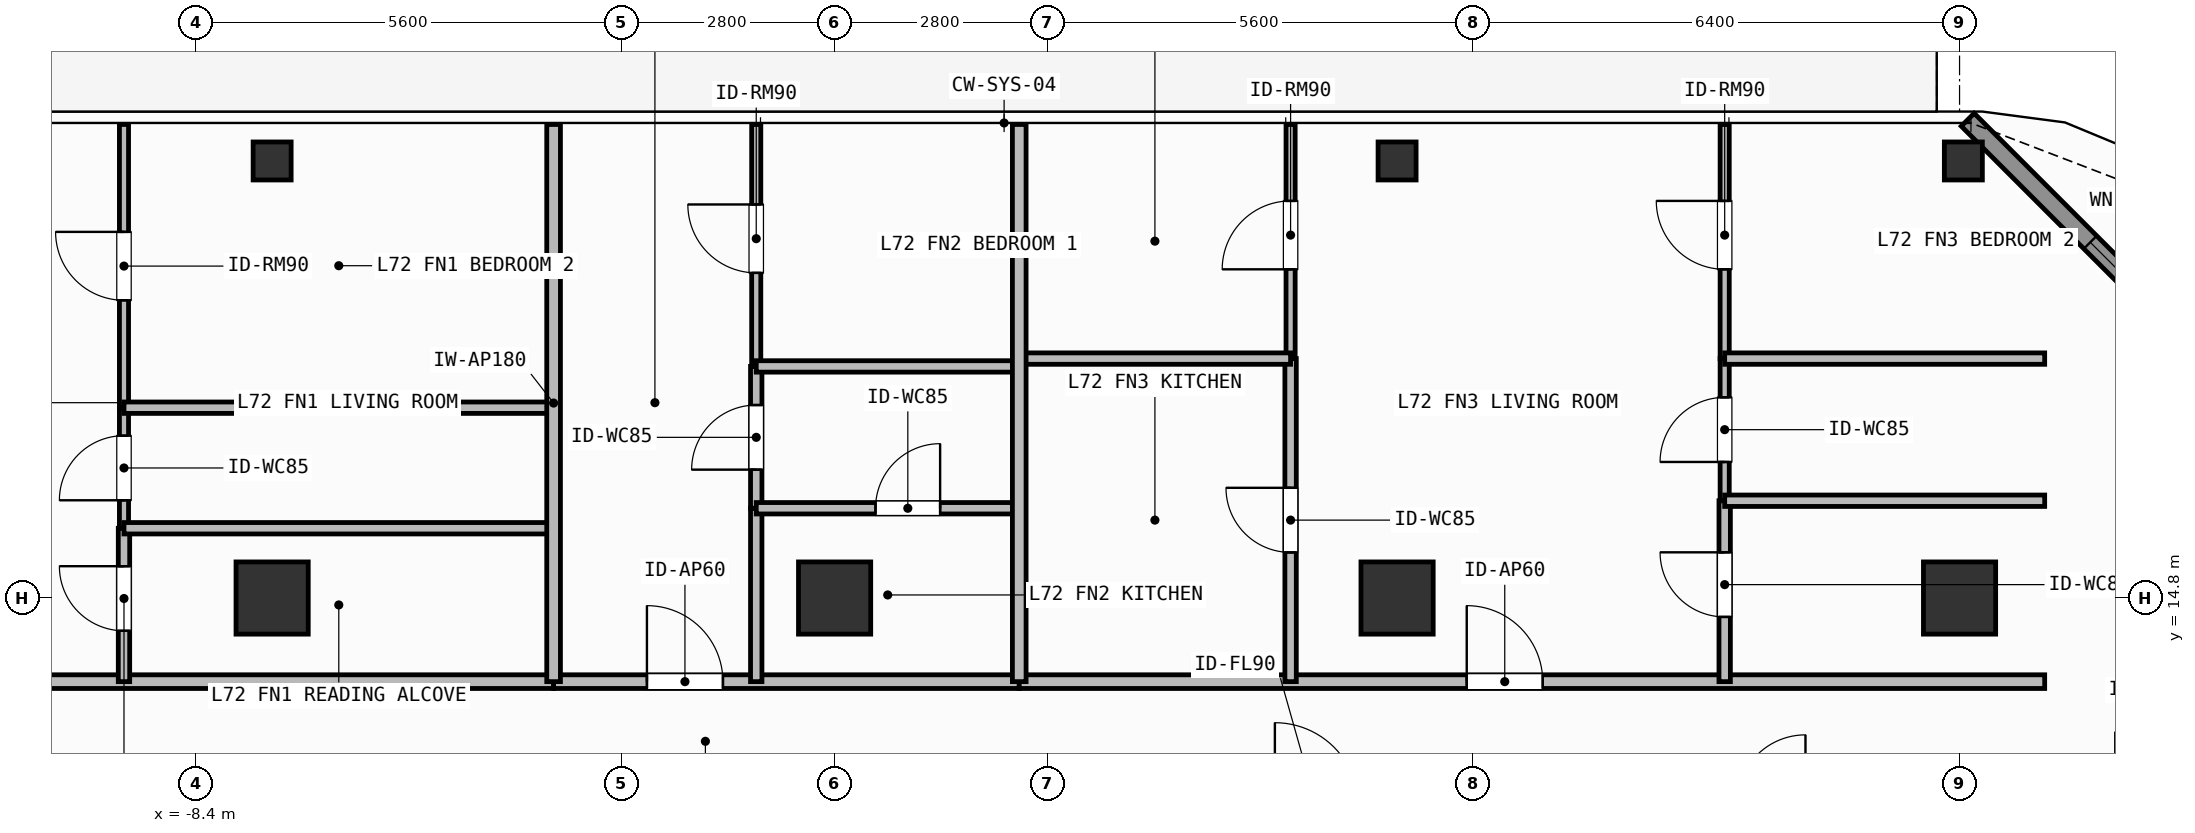
"""IFC4 building model, lengths in metres.
Left out: names, types, materials, properties, quantities, classifications, styles, units other than length and angle.
Written with IfcOpenShell. Run it as: python <this file> out.ifc"""

import sys

from ifc_helpers import new_model, si_unit, direction, frame, frame_2d, origin, origin_2d, place, context, subcontext, project, spatial, rectangle, hollow_rectangle, extrude, element, fill, save


model = new_model("IFC4")
c1 = context("Model", 3, precision=1e-05, world=origin(), true_north=direction((0.0, 1.0)))
c2 = subcontext(c1, "Body", "Model", "MODEL_VIEW")
j1 = project(units=[si_unit("LENGTHUNIT", "METRE"), si_unit("PLANEANGLEUNIT", "RADIAN")], contexts=[c1])
p1 = place(None, origin())
s1 = spatial("IfcSite", under=j1, at=p1, CompositionType="ELEMENT")
p2 = place(p1, origin())
s2 = spatial("IfcBuilding", under=s1, at=p2, CompositionType="ELEMENT")
p3 = place(p2, frame((0.0, 0.0, 293.7)))
s3 = spatial("IfcBuildingStorey", under=s2, at=p3, CompositionType="ELEMENT", Elevation=293.7)
for number, where, z_axis, x_axis in (
    (1, (-7.4, 14.8, 0.0), (0.0, 0.0, 1.0), (1.0, 0.0, 0.0)),
    (2, (0.0, 14.8, 0.0), (0.0, 0.0, 1.0), (1.0, 0.0, 0.0)),
    (3, (7.4, 14.8, 0.0), (0.0, 0.0, 1.0), (1.0, 0.0, 0.0)),
    (4, (14.8, 14.8, 0.0), (0.0, 0.0, 1.0), (1.0, 0.0, 0.0)),
):
    element("IfcColumn", number, at=place(p3, frame(where, z_axis=z_axis, x_axis=x_axis)), inside=s3, PredefinedType="COLUMN", context=c2, shape_type="SweptSolid", body=[
        extrude(rectangle(XDim=0.95, YDim=0.95, at=origin_2d()), origin(), (0.0, 0.0, 1.0), 3.9),
    ])
for number, where, z_axis, x_axis in (
    (5, (14.85, 20.55, 0.0), (0.0, 0.0, 1.0), (1.0, 0.0, 0.0)),
    (6, (-7.4, 20.55, 0.0), (0.0, 0.0, 1.0), (1.0, 0.0, 0.0)),
    (7, (7.4, 20.55, 0.0), (0.0, 0.0, 1.0), (1.0, 0.0, 0.0)),
):
    element("IfcColumn", number, at=place(p3, frame(where, z_axis=z_axis, x_axis=x_axis)), inside=s3, PredefinedType="COLUMN", context=c2, shape_type="SweptSolid", body=[
        extrude(hollow_rectangle(XDim=0.5, YDim=0.5, WallThickness=0.025, at=origin_2d()), origin(), (0.0, 0.0, 1.0), 3.9),
    ])
p4 = place(p3, frame((14.908, 21.092, 0.0), z_axis=(0.0, 0.0, 1.0), x_axis=(0.707106781187, -0.707106781187, 0.0)))
e8 = element("IfcWall", 8, at=p4, inside=s3, PredefinedType="SOLIDWALL", context=c2, shape_type="SweptSolid", body=[
    extrude(rectangle(XDim=6.059, YDim=0.24, at=frame_2d((3.03, 0.0))), origin(), (0.0, 0.0, 1.0), 3.68),
])
p5 = place(p4, frame((2.28, 0.0, 0.8)))
e9 = element("IfcOpeningElement", 9, at=p5, cuts=e8, PredefinedType="OPENING", context=c2, shape_type="SweptSolid", body=[
    extrude(rectangle(XDim=1.5, YDim=1.85, at=frame_2d((0.75, 0.925))), frame((0.0, 0.13, 0.0), z_axis=(0.0, -1.0, 0.0), x_axis=(1.0, 0.0, 0.0)), (0.0, 0.0, 1.0), 0.26),
])
p6 = place(p3, frame((-19.32, 13.7, 0.0), z_axis=(0.0, 0.0, 1.0), x_axis=(1.0, 0.0, 0.0)))
e10 = element("IfcWall", 10, at=p6, inside=s3, PredefinedType="PARTITIONING", context=c2, shape_type="SweptSolid", body=[
    extrude(rectangle(XDim=15.623, YDim=0.18, at=frame_2d((7.812, 0.0))), origin(), (0.0, 0.0, 1.0), 3.68),
])
p7 = place(p6, frame((7.669, 0.0, 0.0)))
e11 = element("IfcOpeningElement", 11, at=p7, cuts=e10, PredefinedType="OPENING", context=c2, shape_type="SweptSolid", body=[
    extrude(rectangle(XDim=1.0, YDim=2.2, at=frame_2d((0.5, 1.1))), frame((0.0, 0.1, 0.0), z_axis=(0.0, -1.0, 0.0), x_axis=(1.0, 0.0, 0.0)), (0.0, 0.0, 1.0), 0.2),
])
p8 = place(p3, frame((-9.349, 13.7, 0.0), z_axis=(0.0, 0.0, 1.0), x_axis=(0.0, 1.0, 0.0)))
e12 = element("IfcWall", 12, at=p8, inside=s3, PredefinedType="PARTITIONING", context=c2, shape_type="SweptSolid", body=[
    extrude(rectangle(XDim=2.018, YDim=0.15, at=frame_2d((1.009, 0.0))), origin(), (0.0, 0.0, 1.0), 3.68),
])
p9 = place(p8, frame((0.669, 0.0, 0.0)))
e13 = element("IfcOpeningElement", 13, at=p9, cuts=e12, PredefinedType="OPENING", context=c2, shape_type="SweptSolid", body=[
    extrude(rectangle(XDim=0.85, YDim=2.1, at=frame_2d((0.425, 1.05))), frame((0.0, 0.085, 0.0), z_axis=(0.0, -1.0, 0.0), x_axis=(1.0, 0.0, 0.0)), (0.0, 0.0, 1.0), 0.17),
])
p10 = place(p3, frame((-9.349, 15.718, 0.0), z_axis=(0.0, 0.0, 1.0), x_axis=(0.0, 1.0, 0.0)))
e14 = element("IfcWall", 14, at=p10, inside=s3, PredefinedType="PARTITIONING", context=c2, shape_type="SweptSolid", body=[
    extrude(rectangle(XDim=1.586, YDim=0.12, at=frame_2d((0.793, 0.0))), origin(), (0.0, 0.0, 1.0), 3.68),
])
p11 = place(p10, frame((0.368, 0.0, 0.0)))
e15 = element("IfcOpeningElement", 15, at=p11, cuts=e14, PredefinedType="OPENING", context=c2, shape_type="SweptSolid", body=[
    extrude(rectangle(XDim=0.85, YDim=2.1, at=frame_2d((0.425, 1.05))), frame((0.0, 0.07, 0.0), z_axis=(0.0, -1.0, 0.0), x_axis=(1.0, 0.0, 0.0)), (0.0, 0.0, 1.0), 0.14),
])
p12 = place(p3, frame((-9.349, 17.304, 0.0), z_axis=(0.0, 0.0, 1.0), x_axis=(0.0, 1.0, 0.0)))
e16 = element("IfcWall", 16, at=p12, inside=s3, PredefinedType="PARTITIONING", context=c2, shape_type="SweptSolid", body=[
    extrude(rectangle(XDim=3.726, YDim=0.12, at=frame_2d((1.863, 0.0))), origin(), (0.0, 0.0, 1.0), 3.68),
])
p13 = place(p12, frame((1.413, 0.0, 0.0)))
e17 = element("IfcOpeningElement", 17, at=p13, cuts=e16, PredefinedType="OPENING", context=c2, shape_type="SweptSolid", body=[
    extrude(rectangle(XDim=0.9, YDim=2.1, at=frame_2d((0.45, 1.05))), frame((0.0, 0.07, 0.0), z_axis=(0.0, -1.0, 0.0), x_axis=(1.0, 0.0, 0.0)), (0.0, 0.0, 1.0), 0.14),
])
p14 = place(p3, frame((-3.697, 13.7, 0.0), z_axis=(0.0, 0.0, 1.0), x_axis=(1.0, 0.0, 0.0)))
e18 = element("IfcWall", 18, at=p14, inside=s3, PredefinedType="PARTITIONING", context=c2, shape_type="SweptSolid", body=[
    extrude(rectangle(XDim=6.126, YDim=0.18, at=frame_2d((3.063, 0.0))), origin(), (0.0, 0.0, 1.0), 3.68),
])
p15 = place(p14, frame((1.228, 0.0, 0.0)))
e19 = element("IfcOpeningElement", 19, at=p15, cuts=e18, PredefinedType="OPENING", context=c2, shape_type="SweptSolid", body=[
    extrude(rectangle(XDim=1.0, YDim=2.2, at=frame_2d((0.5, 1.1))), frame((0.0, 0.1, 0.0), z_axis=(0.0, -1.0, 0.0), x_axis=(1.0, 0.0, 0.0)), (0.0, 0.0, 1.0), 0.2),
])
p16 = place(p3, frame((-1.031, 13.7, 0.0), z_axis=(0.0, 0.0, 1.0), x_axis=(0.0, 1.0, 0.0)))
e20 = element("IfcWall", 20, at=p16, inside=s3, PredefinedType="PARTITIONING", context=c2, shape_type="SweptSolid", body=[
    extrude(rectangle(XDim=2.281, YDim=0.15, at=frame_2d((1.141, 0.0))), origin(), (0.0, 0.0, 1.0), 3.68),
])
p17 = place(p3, frame((-1.031, 15.981, 0.0), z_axis=(0.0, 0.0, 1.0), x_axis=(0.0, 1.0, 0.0)))
e21 = element("IfcWall", 21, at=p17, inside=s3, PredefinedType="PARTITIONING", context=c2, shape_type="SweptSolid", body=[
    extrude(rectangle(XDim=1.866, YDim=0.15, at=frame_2d((0.933, 0.0))), origin(), (0.0, 0.0, 1.0), 3.68),
])
p18 = place(p17, frame((0.508, 0.0, 0.0)))
e22 = element("IfcOpeningElement", 22, at=p18, cuts=e21, PredefinedType="OPENING", context=c2, shape_type="SweptSolid", body=[
    extrude(rectangle(XDim=0.85, YDim=2.1, at=frame_2d((0.425, 1.05))), frame((0.0, 0.085, 0.0), z_axis=(0.0, -1.0, 0.0), x_axis=(1.0, 0.0, 0.0)), (0.0, 0.0, 1.0), 0.17),
])
p19 = place(p3, frame((-1.031, 17.847, 0.0), z_axis=(0.0, 0.0, 1.0), x_axis=(0.0, 1.0, 0.0)))
e23 = element("IfcWall", 23, at=p19, inside=s3, PredefinedType="PARTITIONING", context=c2, shape_type="SweptSolid", body=[
    extrude(rectangle(XDim=3.183, YDim=0.12, at=frame_2d((1.592, 0.0))), origin(), (0.0, 0.0, 1.0), 3.68),
])
p20 = place(p19, frame((1.231, 0.0, 0.0)))
e24 = element("IfcOpeningElement", 24, at=p20, cuts=e23, PredefinedType="OPENING", context=c2, shape_type="SweptSolid", body=[
    extrude(rectangle(XDim=0.9, YDim=2.1, at=frame_2d((0.45, 1.05))), frame((0.0, 0.07, 0.0), z_axis=(0.0, -1.0, 0.0), x_axis=(1.0, 0.0, 0.0)), (0.0, 0.0, 1.0), 0.14),
])
p21 = place(p3, frame((2.429, 13.7, 0.0), z_axis=(0.0, 0.0, 1.0), x_axis=(1.0, 0.0, 0.0)))
e25 = element("IfcWall", 25, at=p21, inside=s3, PredefinedType="PARTITIONING", context=c2, shape_type="SweptSolid", body=[
    extrude(rectangle(XDim=13.491, YDim=0.18, at=frame_2d((6.746, 0.0))), origin(), (0.0, 0.0, 1.0), 3.68),
])
p22 = place(p21, frame((5.887, 0.0, 0.0)))
e26 = element("IfcOpeningElement", 26, at=p22, cuts=e25, PredefinedType="OPENING", context=c2, shape_type="SweptSolid", body=[
    extrude(rectangle(XDim=1.0, YDim=2.2, at=frame_2d((0.5, 1.1))), frame((0.0, 0.1, 0.0), z_axis=(0.0, -1.0, 0.0), x_axis=(1.0, 0.0, 0.0)), (0.0, 0.0, 1.0), 0.2),
])
p23 = place(p3, frame((5.999, 13.7, 0.0), z_axis=(0.0, 0.0, 1.0), x_axis=(0.0, 1.0, 0.0)))
e27 = element("IfcWall", 27, at=p23, inside=s3, PredefinedType="PARTITIONING", context=c2, shape_type="SweptSolid", body=[
    extrude(rectangle(XDim=4.25, YDim=0.15, at=frame_2d((2.125, 0.0))), origin(), (0.0, 0.0, 1.0), 3.68),
])
p24 = place(p23, frame((1.7, 0.0, 0.0)))
e28 = element("IfcOpeningElement", 28, at=p24, cuts=e27, PredefinedType="OPENING", context=c2, shape_type="SweptSolid", body=[
    extrude(rectangle(XDim=0.85, YDim=2.1, at=frame_2d((0.425, 1.05))), frame((0.0, 0.085, 0.0), z_axis=(0.0, -1.0, 0.0), x_axis=(1.0, 0.0, 0.0)), (0.0, 0.0, 1.0), 0.17),
])
p25 = place(p3, frame((5.999, 17.95, 0.0), z_axis=(0.0, 0.0, 1.0), x_axis=(0.0, 1.0, 0.0)))
e29 = element("IfcWall", 29, at=p25, inside=s3, PredefinedType="PARTITIONING", context=c2, shape_type="SweptSolid", body=[
    extrude(rectangle(XDim=3.08, YDim=0.12, at=frame_2d((1.54, 0.0))), origin(), (0.0, 0.0, 1.0), 3.68),
])
p26 = place(p25, frame((1.175, 0.0, 0.0)))
e30 = element("IfcOpeningElement", 30, at=p26, cuts=e29, PredefinedType="OPENING", context=c2, shape_type="SweptSolid", body=[
    extrude(rectangle(XDim=0.9, YDim=2.1, at=frame_2d((0.45, 1.05))), frame((0.0, 0.07, 0.0), z_axis=(0.0, -1.0, 0.0), x_axis=(1.0, 0.0, 0.0)), (0.0, 0.0, 1.0), 0.14),
])
p27 = place(p3, frame((11.71, 13.7, 0.0), z_axis=(0.0, 0.0, 1.0), x_axis=(0.0, 1.0, 0.0)))
e31 = element("IfcWall", 31, at=p27, inside=s3, PredefinedType="PARTITIONING", context=c2, shape_type="SweptSolid", body=[
    extrude(rectangle(XDim=2.38, YDim=0.15, at=frame_2d((1.19, 0.0))), origin(), (0.0, 0.0, 1.0), 3.68),
])
p28 = place(p27, frame((0.851, 0.0, 0.0)))
e32 = element("IfcOpeningElement", 32, at=p28, cuts=e31, PredefinedType="OPENING", context=c2, shape_type="SweptSolid", body=[
    extrude(rectangle(XDim=0.85, YDim=2.1, at=frame_2d((0.425, 1.05))), frame((0.0, 0.085, 0.0), z_axis=(0.0, -1.0, 0.0), x_axis=(1.0, 0.0, 0.0)), (0.0, 0.0, 1.0), 0.17),
])
p29 = place(p3, frame((11.71, 16.08, 0.0), z_axis=(0.0, 0.0, 1.0), x_axis=(0.0, 1.0, 0.0)))
e33 = element("IfcWall", 33, at=p29, inside=s3, PredefinedType="PARTITIONING", context=c2, shape_type="SweptSolid", body=[
    extrude(rectangle(XDim=1.87, YDim=0.12, at=frame_2d((0.935, 0.0))), origin(), (0.0, 0.0, 1.0), 3.68),
])
p30 = place(p29, frame((0.51, 0.0, 0.0)))
e34 = element("IfcOpeningElement", 34, at=p30, cuts=e33, PredefinedType="OPENING", context=c2, shape_type="SweptSolid", body=[
    extrude(rectangle(XDim=0.85, YDim=2.1, at=frame_2d((0.425, 1.05))), frame((0.0, 0.07, 0.0), z_axis=(0.0, -1.0, 0.0), x_axis=(1.0, 0.0, 0.0)), (0.0, 0.0, 1.0), 0.14),
])
p31 = place(p3, frame((11.71, 17.95, 0.0), z_axis=(0.0, 0.0, 1.0), x_axis=(0.0, 1.0, 0.0)))
e35 = element("IfcWall", 35, at=p31, inside=s3, PredefinedType="PARTITIONING", context=c2, shape_type="SweptSolid", body=[
    extrude(rectangle(XDim=3.08, YDim=0.12, at=frame_2d((1.54, 0.0))), origin(), (0.0, 0.0, 1.0), 3.68),
])
p32 = place(p31, frame((1.175, 0.0, 0.0)))
e36 = element("IfcOpeningElement", 36, at=p32, cuts=e35, PredefinedType="OPENING", context=c2, shape_type="SweptSolid", body=[
    extrude(rectangle(XDim=0.9, YDim=2.1, at=frame_2d((0.45, 1.05))), frame((0.0, 0.07, 0.0), z_axis=(0.0, -1.0, 0.0), x_axis=(1.0, 0.0, 0.0)), (0.0, 0.0, 1.0), 0.14),
])
for number, where, z_axis, x_axis in (
    (37, (-9.349, 15.718, 0.0), (0.0, 0.0, 1.0), (1.0, 0.0, 0.0)),
    (38, (-9.349, 17.304, 0.0), (0.0, 0.0, 1.0), (1.0, 0.0, 0.0)),
):
    element("IfcWall", number, at=place(p3, frame(where, z_axis=z_axis, x_axis=x_axis)), inside=s3, PredefinedType="PARTITIONING", context=c2, shape_type="SweptSolid", body=[
        extrude(rectangle(XDim=5.652, YDim=0.15, at=frame_2d((2.826, 0.0))), origin(), (0.0, 0.0, 1.0), 3.68),
    ])
p33 = place(p3, frame((-1.031, 15.981, 0.0), z_axis=(0.0, 0.0, 1.0), x_axis=(1.0, 0.0, 0.0)))
e39 = element("IfcWall", 39, at=p33, inside=s3, PredefinedType="PARTITIONING", context=c2, shape_type="SweptSolid", body=[
    extrude(rectangle(XDim=3.46, YDim=0.15, at=frame_2d((1.73, 0.0))), origin(), (0.0, 0.0, 1.0), 3.68),
])
p34 = place(p33, frame((1.569, 0.0, 0.0)))
e40 = element("IfcOpeningElement", 40, at=p34, cuts=e39, PredefinedType="OPENING", context=c2, shape_type="SweptSolid", body=[
    extrude(rectangle(XDim=0.85, YDim=2.1, at=frame_2d((0.425, 1.05))), frame((0.0, 0.085, 0.0), z_axis=(0.0, -1.0, 0.0), x_axis=(1.0, 0.0, 0.0)), (0.0, 0.0, 1.0), 0.17),
])
p35 = place(p3, frame((-1.031, 17.847, 0.0), z_axis=(0.0, 0.0, 1.0), x_axis=(1.0, 0.0, 0.0)))
e41 = element("IfcWall", 41, at=p35, inside=s3, PredefinedType="PARTITIONING", context=c2, shape_type="SweptSolid", body=[
    extrude(rectangle(XDim=3.46, YDim=0.15, at=frame_2d((1.73, 0.0))), origin(), (0.0, 0.0, 1.0), 3.68),
])
p36 = place(p3, frame((-3.697, 13.7, 0.0), z_axis=(0.0, 0.0, 1.0), x_axis=(0.0, 1.0, 0.0)))
e42 = element("IfcWall", 42, at=p36, inside=s3, PredefinedType="PARTITIONING", context=c2, shape_type="SweptSolid", body=[
    extrude(rectangle(XDim=7.33, YDim=0.18, at=frame_2d((3.665, 0.0))), origin(), (0.0, 0.0, 1.0), 3.68),
])
p37 = place(p3, frame((2.429, 17.95, 0.0), z_axis=(0.0, 0.0, 1.0), x_axis=(1.0, 0.0, 0.0)))
e43 = element("IfcWall", 43, at=p37, inside=s3, PredefinedType="PARTITIONING", context=c2, shape_type="SweptSolid", body=[
    extrude(rectangle(XDim=3.57, YDim=0.15, at=frame_2d((1.785, 0.0))), origin(), (0.0, 0.0, 1.0), 3.68),
])
for number, where, z_axis, x_axis in (
    (44, (11.71, 16.08, 0.0), (0.0, 0.0, 1.0), (1.0, 0.0, 0.0)),
    (45, (11.71, 17.95, 0.0), (0.0, 0.0, 1.0), (1.0, 0.0, 0.0)),
):
    element("IfcWall", number, at=place(p3, frame(where, z_axis=z_axis, x_axis=x_axis)), inside=s3, PredefinedType="PARTITIONING", context=c2, shape_type="SweptSolid", body=[
        extrude(rectangle(XDim=4.21, YDim=0.15, at=frame_2d((2.105, 0.0))), origin(), (0.0, 0.0, 1.0), 3.68),
    ])
p38 = place(p3, frame((2.429, 13.7, 0.0), z_axis=(0.0, 0.0, 1.0), x_axis=(0.0, 1.0, 0.0)))
e46 = element("IfcWall", 46, at=p38, inside=s3, PredefinedType="PARTITIONING", context=c2, shape_type="SweptSolid", body=[
    extrude(rectangle(XDim=7.33, YDim=0.18, at=frame_2d((3.665, 0.0))), origin(), (0.0, 0.0, 1.0), 3.68),
])
p39 = place(p5, origin())
e47 = element("IfcWindow", 47, at=p39, inside=s3, PartitioningType="SINGLE_PANEL", PredefinedType="WINDOW", context=c2, shape_type="SweptSolid", body=[
    extrude(rectangle(XDim=1.5, YDim=1.85, at=frame_2d((0.75, 0.925))), frame((0.0, 0.03, 0.0), z_axis=(0.0, -1.0, 0.0), x_axis=(1.0, 0.0, 0.0)), (0.0, 0.0, 1.0), 0.06),
])
fill(e9, e47)
p40 = place(p9, origin())
e48 = element("IfcDoor", 48, at=p40, inside=s3, OperationType="SINGLE_SWING_RIGHT", PredefinedType="DOOR", context=c2, shape_type="SweptSolid", body=[
    extrude(rectangle(XDim=0.85, YDim=2.1, at=frame_2d((0.425, 1.05))), frame((0.0, 0.025, 0.0), z_axis=(0.0, -1.0, 0.0), x_axis=(1.0, 0.0, 0.0)), (0.0, 0.0, 1.0), 0.05),
])
fill(e13, e48)
p41 = place(p11, origin())
e49 = element("IfcDoor", 49, at=p41, inside=s3, OperationType="SINGLE_SWING_LEFT", PredefinedType="DOOR", context=c2, shape_type="SweptSolid", body=[
    extrude(rectangle(XDim=0.85, YDim=2.1, at=frame_2d((0.425, 1.05))), frame((0.0, 0.025, 0.0), z_axis=(0.0, -1.0, 0.0), x_axis=(1.0, 0.0, 0.0)), (0.0, 0.0, 1.0), 0.05),
])
fill(e15, e49)
p42 = place(p13, origin())
e50 = element("IfcDoor", 50, at=p42, inside=s3, OperationType="SINGLE_SWING_RIGHT", PredefinedType="DOOR", context=c2, shape_type="SweptSolid", body=[
    extrude(rectangle(XDim=0.9, YDim=2.1, at=frame_2d((0.45, 1.05))), frame((0.0, 0.025, 0.0), z_axis=(0.0, -1.0, 0.0), x_axis=(1.0, 0.0, 0.0)), (0.0, 0.0, 1.0), 0.05),
])
fill(e17, e50)
p43 = place(p15, origin())
e51 = element("IfcDoor", 51, at=p43, inside=s3, OperationType="SINGLE_SWING_LEFT", PredefinedType="DOOR", context=c2, shape_type="SweptSolid", body=[
    extrude(rectangle(XDim=1.0, YDim=2.2, at=frame_2d((0.5, 1.1))), frame((0.0, 0.025, 0.0), z_axis=(0.0, -1.0, 0.0), x_axis=(1.0, 0.0, 0.0)), (0.0, 0.0, 1.0), 0.05),
])
fill(e19, e51)
p44 = place(p34, origin())
e52 = element("IfcDoor", 52, at=p44, inside=s3, OperationType="SINGLE_SWING_RIGHT", PredefinedType="DOOR", context=c2, shape_type="SweptSolid", body=[
    extrude(rectangle(XDim=0.85, YDim=2.1, at=frame_2d((0.425, 1.05))), frame((0.0, 0.025, 0.0), z_axis=(0.0, -1.0, 0.0), x_axis=(1.0, 0.0, 0.0)), (0.0, 0.0, 1.0), 0.05),
])
fill(e40, e52)
p45 = place(p18, origin())
e53 = element("IfcDoor", 53, at=p45, inside=s3, OperationType="SINGLE_SWING_LEFT", PredefinedType="DOOR", context=c2, shape_type="SweptSolid", body=[
    extrude(rectangle(XDim=0.85, YDim=2.1, at=frame_2d((0.425, 1.05))), frame((0.0, 0.025, 0.0), z_axis=(0.0, -1.0, 0.0), x_axis=(1.0, 0.0, 0.0)), (0.0, 0.0, 1.0), 0.05),
])
fill(e22, e53)
p46 = place(p20, origin())
e54 = element("IfcDoor", 54, at=p46, inside=s3, OperationType="SINGLE_SWING_RIGHT", PredefinedType="DOOR", context=c2, shape_type="SweptSolid", body=[
    extrude(rectangle(XDim=0.9, YDim=2.1, at=frame_2d((0.45, 1.05))), frame((0.0, 0.025, 0.0), z_axis=(0.0, -1.0, 0.0), x_axis=(1.0, 0.0, 0.0)), (0.0, 0.0, 1.0), 0.05),
])
fill(e24, e54)
p47 = place(p22, origin())
e55 = element("IfcDoor", 55, at=p47, inside=s3, OperationType="SINGLE_SWING_LEFT", PredefinedType="DOOR", context=c2, shape_type="SweptSolid", body=[
    extrude(rectangle(XDim=1.0, YDim=2.2, at=frame_2d((0.5, 1.1))), frame((0.0, 0.025, 0.0), z_axis=(0.0, -1.0, 0.0), x_axis=(1.0, 0.0, 0.0)), (0.0, 0.0, 1.0), 0.05),
])
fill(e26, e55)
p48 = place(p24, origin())
e56 = element("IfcDoor", 56, at=p48, inside=s3, OperationType="SINGLE_SWING_RIGHT", PredefinedType="DOOR", context=c2, shape_type="SweptSolid", body=[
    extrude(rectangle(XDim=0.85, YDim=2.1, at=frame_2d((0.425, 1.05))), frame((0.0, 0.025, 0.0), z_axis=(0.0, -1.0, 0.0), x_axis=(1.0, 0.0, 0.0)), (0.0, 0.0, 1.0), 0.05),
])
fill(e28, e56)
p49 = place(p26, origin())
e57 = element("IfcDoor", 57, at=p49, inside=s3, OperationType="SINGLE_SWING_LEFT", PredefinedType="DOOR", context=c2, shape_type="SweptSolid", body=[
    extrude(rectangle(XDim=0.9, YDim=2.1, at=frame_2d((0.45, 1.05))), frame((0.0, 0.025, 0.0), z_axis=(0.0, -1.0, 0.0), x_axis=(1.0, 0.0, 0.0)), (0.0, 0.0, 1.0), 0.05),
])
fill(e30, e57)
p50 = place(p28, origin())
e58 = element("IfcDoor", 58, at=p50, inside=s3, OperationType="SINGLE_SWING_RIGHT", PredefinedType="DOOR", context=c2, shape_type="SweptSolid", body=[
    extrude(rectangle(XDim=0.85, YDim=2.1, at=frame_2d((0.425, 1.05))), frame((0.0, 0.025, 0.0), z_axis=(0.0, -1.0, 0.0), x_axis=(1.0, 0.0, 0.0)), (0.0, 0.0, 1.0), 0.05),
])
fill(e32, e58)
p51 = place(p30, origin())
e59 = element("IfcDoor", 59, at=p51, inside=s3, OperationType="SINGLE_SWING_LEFT", PredefinedType="DOOR", context=c2, shape_type="SweptSolid", body=[
    extrude(rectangle(XDim=0.85, YDim=2.1, at=frame_2d((0.425, 1.05))), frame((0.0, 0.025, 0.0), z_axis=(0.0, -1.0, 0.0), x_axis=(1.0, 0.0, 0.0)), (0.0, 0.0, 1.0), 0.05),
])
fill(e34, e59)
p52 = place(p32, origin())
e60 = element("IfcDoor", 60, at=p52, inside=s3, OperationType="SINGLE_SWING_RIGHT", PredefinedType="DOOR", context=c2, shape_type="SweptSolid", body=[
    extrude(rectangle(XDim=0.9, YDim=2.1, at=frame_2d((0.45, 1.05))), frame((0.0, 0.025, 0.0), z_axis=(0.0, -1.0, 0.0), x_axis=(1.0, 0.0, 0.0)), (0.0, 0.0, 1.0), 0.05),
])
fill(e36, e60)
save(model, sys.argv[1])
